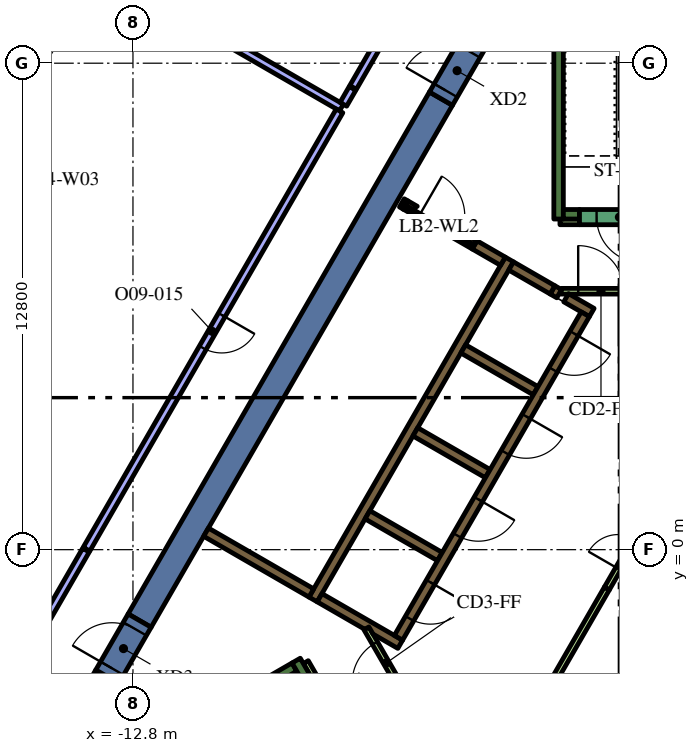
"""IFC4 building model, lengths in metres.
Left out: names, types, materials, properties, quantities, classifications, styles, units other than length and angle.
Written with IfcOpenShell. Run it as: python <this file> out.ifc"""

import sys

from ifc_helpers import new_model, si_unit, direction, frame, frame_2d, origin, place, context, subcontext, project, spatial, polyline, rectangle, outline, extrude, element, fill, save


model = new_model("IFC4")
c1 = context("Model", 3, precision=1e-05, world=origin(), true_north=direction((0.0, 1.0)))
c2 = subcontext(c1, "Body", "Model", "MODEL_VIEW")
j1 = project(units=[si_unit("LENGTHUNIT", "METRE"), si_unit("PLANEANGLEUNIT", "RADIAN")], contexts=[c1])
p1 = place(None, origin())
s1 = spatial("IfcSite", under=j1, at=p1, CompositionType="ELEMENT")
p2 = place(p1, origin())
s2 = spatial("IfcBuilding", under=s1, at=p2, CompositionType="ELEMENT")
p3 = place(p2, frame((0.0, 0.0, 239.4)))
s3 = spatial("IfcBuildingStorey", under=s2, at=p3, CompositionType="ELEMENT", Elevation=239.4)
p4 = place(p3, frame((-13.475, -3.339, 0.0), z_axis=(0.0, 0.0, 1.0), x_axis=(-0.499944726303, -0.866057313716, 0.0)))
e1 = element("IfcWall", 1, at=p4, inside=s3, PredefinedType="SOLIDWALL", context=c2, shape_type="SweptSolid", body=[
    extrude(rectangle(XDim=2.884, YDim=0.7, at=frame_2d((1.442, 0.0))), origin(), (0.0, 0.0, 1.0), 4.2),
])
p5 = place(p3, frame((-12.625, -1.867, 0.0), z_axis=(0.0, 0.0, 1.0), x_axis=(0.500008520515, 0.866020484407, 0.0)))
e2 = element("IfcWall", 2, at=p5, inside=s3, PredefinedType="SOLIDWALL", context=c2, shape_type="SweptSolid", body=[
    extrude(rectangle(XDim=15.859, YDim=0.7, at=frame_2d((7.929, 0.0))), origin(), (0.0, 0.0, 1.0), 4.2),
])
p6 = place(p3, frame((-1.6, 8.7, 0.0), z_axis=(0.0, 0.0, 1.0), x_axis=(0.0, 1.0, 0.0)))
e3 = element("IfcWall", 3, at=p6, inside=s3, PredefinedType="SOLIDWALL", context=c2, shape_type="SweptSolid", body=[
    extrude(rectangle(XDim=7.05, YDim=0.25, at=frame_2d((3.525, 0.0))), origin(), (0.0, 0.0, 1.0), 4.2),
])
p7 = place(p3, frame((-1.475, 8.825, 0.0), z_axis=(0.0, 0.0, 1.0), x_axis=(1.0, 0.0, 0.0)))
e4 = element("IfcWall", 4, at=p7, inside=s3, PredefinedType="SOLIDWALL", context=c2, shape_type="SweptSolid", body=[
    extrude(rectangle(XDim=0.425, YDim=0.25, at=frame_2d((0.212, 0.0))), origin(), (0.0, 0.0, 1.0), 4.2),
])
p8 = place(p3, frame((-14.44, -6.49, 0.0), z_axis=(0.0, 0.0, 1.0), x_axis=(0.866022966069, 0.500004222222, 0.0)))
e5 = element("IfcWall", 5, at=p8, inside=s3, PredefinedType="SOLIDWALL", context=c2, shape_type="SweptSolid", body=[
    extrude(rectangle(XDim=6.8, YDim=0.25, at=frame_2d((3.4, 0.0))), origin(), (0.0, 0.0, 1.0), 4.2),
])
p9 = place(p3, frame((-8.168, -3.503, 0.0), z_axis=(0.0, 0.0, 1.0), x_axis=(-0.499952099219, 0.866053057547, 0.0)))
e6 = element("IfcWall", 6, at=p9, inside=s3, PredefinedType="SOLIDWALL", context=c2, shape_type="SweptSolid", body=[
    extrude(rectangle(XDim=0.675, YDim=0.25, at=frame_2d((0.337, 0.0))), origin(), (0.0, 0.0, 1.0), 4.2),
])
p10 = place(p3, frame((-8.06, -1.311, 0.0), z_axis=(0.0, 0.0, 1.0), x_axis=(0.50000273126, 0.866023826885, 0.0)))
e7 = element("IfcWall", 7, at=p10, inside=s3, PredefinedType="SOLIDWALL", context=c2, shape_type="SweptSolid", body=[
    extrude(rectangle(XDim=10.33, YDim=0.25, at=frame_2d((5.165, 0.0))), origin(), (0.0, 0.0, 1.0), 4.2),
])
p11 = place(p3, frame((-1.758, 6.835, 0.0), z_axis=(0.0, 0.0, 1.0), x_axis=(0.865982457891, -0.500074377092, 0.0)))
e8 = element("IfcWall", 8, at=p11, inside=s3, PredefinedType="SOLIDWALL", context=c2, shape_type="SweptSolid", body=[
    extrude(rectangle(XDim=0.2, YDim=0.25, at=frame_2d((0.1, 0.0))), origin(), (0.0, 0.0, 1.0), 4.2),
])
p12 = place(p3, frame((-1.76, 6.836, 0.0), z_axis=(0.0, 0.0, 1.0), x_axis=(-0.865952863304, 0.500125622755, 0.0)))
e9 = element("IfcWall", 9, at=p12, inside=s3, PredefinedType="SOLIDWALL", context=c2, shape_type="SweptSolid", body=[
    extrude(rectangle(XDim=1.258, YDim=0.25, at=frame_2d((0.629, 0.0))), origin(), (0.0, 0.0, 1.0), 4.2),
])
p13 = place(p3, frame((-0.728, 6.24, 0.0), z_axis=(0.0, 0.0, 1.0), x_axis=(-0.865955664968, 0.500120771724, 0.0)))
e10 = element("IfcWall", 10, at=p13, inside=s3, PredefinedType="SOLIDWALL", context=c2, shape_type="SweptSolid", body=[
    extrude(rectangle(XDim=0.778, YDim=0.25, at=frame_2d((0.389, 0.0))), origin(), (0.0, 0.0, 1.0), 4.2),
])
for number, where, z_axis, x_axis in (
    (11, (-2.204, 4.182, 0.0), (0.0, 0.0, 1.0), (-0.866, 0.5, 0.0)),
    (12, (-5.369, 3.1, 0.0), (0.0, 0.0, 1.0), (0.866, -0.5, 0.0)),
    (13, (-4.724, -0.182, 0.0), (0.0, 0.0, 1.0), (-0.866, 0.5, 0.0)),
):
    element("IfcWall", number, at=place(p3, frame(where, z_axis=z_axis, x_axis=x_axis)), inside=s3, PredefinedType="SOLIDWALL", context=c2, shape_type="SweptSolid", body=[
        extrude(rectangle(XDim=2.2, YDim=0.25, at=frame_2d((1.1, 0.0))), origin(), (0.0, 0.0, 1.0), 4.2),
    ])
p14 = place(p3, origin())
e14 = element("IfcWall", 14, at=p14, inside=s3, PredefinedType="SOLIDWALL", context=c2, shape_type="SweptSolid", body=[
    extrude(outline(polyline([(-5.922, -2.257), (-5.922, -2.257), (-5.705, -2.382), (-5.83, -2.598), (-6.483, -2.221), (-6.591, -2.033), (-6.591, -2.033), (-6.7, -2.096), (-7.952, -1.373), (-7.827, -1.156), (-5.922, -2.257)])), origin(), (0.0, 0.0, 1.0), 4.2),
])
p15 = place(p3, frame((-8.106, -1.14, 0.0), z_axis=(0.0, 0.0, 1.0), x_axis=(-0.866008981251, 0.500028443584, 0.0)))
e15 = element("IfcWall", 15, at=p15, inside=s3, PredefinedType="SOLIDWALL", context=c2, shape_type="SweptSolid", body=[
    extrude(rectangle(XDim=3.2, YDim=0.25, at=frame_2d((1.6, 0.0))), origin(), (0.0, 0.0, 1.0), 4.2),
])
p16 = place(p3, frame((-5.725, 9.125, 0.0), z_axis=(0.0, 0.0, 1.0), x_axis=(0.866185586049, -0.49972245349, 0.0)))
e16 = element("IfcWall", 16, at=p16, inside=s3, PredefinedType="SOLIDWALL", context=c2, shape_type="SweptSolid", body=[
    extrude(rectangle(XDim=0.11, YDim=0.25, at=frame_2d((0.055, 0.0))), origin(), (0.0, 0.0, 1.0), 4.2),
])
p17 = place(p3, frame((-3.066, 7.59, 0.0), z_axis=(0.0, 0.0, 1.0), x_axis=(-0.866081358704, 0.49990307071, 0.0)))
e17 = element("IfcWall", 17, at=p17, inside=s3, PredefinedType="SOLIDWALL", context=c2, shape_type="SweptSolid", body=[
    extrude(rectangle(XDim=0.858, YDim=0.25, at=frame_2d((0.429, 0.0))), origin(), (0.0, 0.0, 1.0), 4.2),
])
e18 = element("IfcWall", 18, at=p14, inside=s3, PredefinedType="SOLIDWALL", context=c2, shape_type="SweptSolid", body=[
    extrude(outline(polyline([(-3.748, 8.128), (-3.813, 8.015), (-4.027, 8.139), (-4.017, 8.156), (-4.008, 8.173), (-4.0, 8.192), (-3.995, 8.21), (-3.991, 8.23), (-3.99, 8.25), (-3.99, 8.268), (-3.748, 8.128)])), origin(), (0.0, 0.0, 1.0), 4.2),
])
e19 = element("IfcWall", 19, at=p14, inside=s3, PredefinedType="SOLIDWALL", context=c2, shape_type="SweptSolid", body=[
    extrude(outline(polyline([(-5.689, 8.96), (-5.69, 8.961), (-5.565, 9.177), (-5.319, 9.035), (-5.335, 9.026), (-5.351, 9.015), (-5.366, 9.002), (-5.379, 8.988), (-5.392, 8.972), (-5.402, 8.956), (-5.412, 8.939), (-5.629, 9.064), (-5.629, 9.064), (-5.689, 8.96)])), origin(), (0.0, 0.0, 1.0), 4.2),
])
for number, where, z_axis, x_axis in (
    (20, (-8.252, -2.958, 0.0), (0.0, 0.0, 1.0), (0.5, -0.866, 0.0)),
    (21, (-1.564, 8.625, 0.0), (0.0, 0.0, 1.0), (1.0, 0.0, 0.0)),
):
    element("IfcWall", number, at=place(p3, frame(where, z_axis=z_axis, x_axis=x_axis)), inside=s3, PredefinedType="PARTITIONING", context=c2, shape_type="SweptSolid", body=[
        extrude(rectangle(XDim=0.514, YDim=0.15, at=frame_2d((0.257, 0.0))), origin(), (0.0, 0.0, 1.0), 3.45),
    ])
p18 = place(p3, frame((-1.887, -3.718, 0.0), z_axis=(0.0, 0.0, 1.0), x_axis=(0.500043732237, 0.866000153493, 0.0)))
e22 = element("IfcWall", 22, at=p18, inside=s3, PredefinedType="PARTITIONING", context=c2, shape_type="SweptSolid", body=[
    extrude(rectangle(XDim=3.114, YDim=0.15, at=frame_2d((1.557, 0.0))), origin(), (0.0, 0.0, 1.0), 3.45),
])
p19 = place(p3, frame((-0.898, 6.194, 0.0), z_axis=(0.0, 0.0, 1.0), x_axis=(-0.499996202215, -0.866027596426, 0.0)))
e23 = element("IfcWall", 23, at=p19, inside=s3, PredefinedType="SOLIDWALL", context=c2, shape_type="SweptSolid", body=[
    extrude(rectangle(XDim=9.83, YDim=0.25, at=frame_2d((4.915, 0.0))), origin(), (0.0, 0.0, 1.0), 4.2),
])
p20 = place(p19, frame((0.585, 0.0, 0.0)))
e24 = element("IfcOpeningElement", 24, at=p20, cuts=e23, PredefinedType="OPENING", context=c2, shape_type="SweptSolid", body=[
    extrude(rectangle(XDim=1.1, YDim=2.1, at=frame_2d((0.55, 1.05))), frame((0.0, 0.135, 0.0), z_axis=(0.0, -1.0, 0.0), x_axis=(1.0, 0.0, 0.0)), (0.0, 0.0, 1.0), 0.27),
])
p21 = place(p19, frame((3.105, 0.0, 0.0)))
e25 = element("IfcOpeningElement", 25, at=p21, cuts=e23, PredefinedType="OPENING", context=c2, shape_type="SweptSolid", body=[
    extrude(rectangle(XDim=1.1, YDim=2.1, at=frame_2d((0.55, 1.05))), frame((0.0, 0.135, 0.0), z_axis=(0.0, -1.0, 0.0), x_axis=(1.0, 0.0, 0.0)), (0.0, 0.0, 1.0), 0.27),
])
p22 = place(p19, frame((5.625, 0.0, 0.0)))
e26 = element("IfcOpeningElement", 26, at=p22, cuts=e23, PredefinedType="OPENING", context=c2, shape_type="SweptSolid", body=[
    extrude(rectangle(XDim=1.1, YDim=2.1, at=frame_2d((0.55, 1.05))), frame((0.0, 0.135, 0.0), z_axis=(0.0, -1.0, 0.0), x_axis=(1.0, 0.0, 0.0)), (0.0, 0.0, 1.0), 0.27),
])
p23 = place(p19, frame((8.145, 0.0, 0.0)))
e27 = element("IfcOpeningElement", 27, at=p23, cuts=e23, PredefinedType="OPENING", context=c2, shape_type="SweptSolid", body=[
    extrude(rectangle(XDim=1.1, YDim=2.1, at=frame_2d((0.55, 1.05))), frame((0.0, 0.135, 0.0), z_axis=(0.0, -1.0, 0.0), x_axis=(1.0, 0.0, 0.0)), (0.0, 0.0, 1.0), 0.27),
])
p24 = place(p3, frame((1.05, 8.75, 0.0), z_axis=(0.0, 0.0, 1.0), x_axis=(-1.0, 0.0, 0.0)))
e28 = element("IfcWall", 28, at=p24, inside=s3, PredefinedType="SOLIDWALL", context=c2, shape_type="SweptSolid", body=[
    extrude(rectangle(XDim=2.1, YDim=0.4, at=frame_2d((1.05, 0.0))), origin(), (0.0, 0.0, 1.0), 4.2),
])
p25 = place(p24, frame((0.45, 0.0, 0.0)))
e29 = element("IfcOpeningElement", 29, at=p25, cuts=e28, PredefinedType="OPENING", context=c2, shape_type="SweptSolid", body=[
    extrude(rectangle(XDim=1.2, YDim=2.1, at=frame_2d((0.6, 1.05))), frame((0.0, 0.21, 0.0), z_axis=(0.0, -1.0, 0.0), x_axis=(1.0, 0.0, 0.0)), (0.0, 0.0, 1.0), 0.42),
])
p26 = place(p3, frame((-0.33, -1.022, 0.0), z_axis=(0.0, 0.0, 1.0), x_axis=(0.500027713859, 0.866009402589, 0.0)))
e30 = element("IfcWall", 30, at=p26, inside=s3, PredefinedType="PARTITIONING", context=c2, shape_type="SweptSolid", body=[
    extrude(rectangle(XDim=2.1, YDim=0.15, at=frame_2d((1.05, 0.0))), origin(), (0.0, 0.0, 1.0), 3.45),
])
p27 = place(p26, frame((0.6, 0.0, 0.0)))
e31 = element("IfcOpeningElement", 31, at=p27, cuts=e30, PredefinedType="OPENING", context=c2, shape_type="SweptSolid", body=[
    extrude(rectangle(XDim=0.9, YDim=2.1, at=frame_2d((0.45, 1.05))), frame((0.0, 0.085, 0.0), z_axis=(0.0, -1.0, 0.0), x_axis=(1.0, 0.0, 0.0)), (0.0, 0.0, 1.0), 0.17),
])
p28 = place(p3, frame((-1.534, 6.8, 0.0), z_axis=(0.0, 0.0, 1.0), x_axis=(1.0, 0.0, 0.0)))
e32 = element("IfcWall", 32, at=p28, inside=s3, PredefinedType="PARTITIONING", context=c2, shape_type="SweptSolid", body=[
    extrude(rectangle(XDim=2.1, YDim=0.15, at=frame_2d((1.05, 0.0))), origin(), (0.0, 0.0, 1.0), 3.45),
])
p29 = place(p28, frame((0.45, 0.0, 0.0)))
e33 = element("IfcOpeningElement", 33, at=p29, cuts=e32, PredefinedType="OPENING", context=c2, shape_type="SweptSolid", body=[
    extrude(rectangle(XDim=1.2, YDim=2.1, at=frame_2d((0.6, 1.05))), frame((0.0, 0.085, 0.0), z_axis=(0.0, -1.0, 0.0), x_axis=(1.0, 0.0, 0.0)), (0.0, 0.0, 1.0), 0.17),
])
p30 = place(p3, frame((-5.606, -3.89, 0.0), z_axis=(0.0, 0.0, 1.0), x_axis=(-0.500027713859, 0.866009402589, 0.0)))
e34 = element("IfcWall", 34, at=p30, inside=s3, PredefinedType="PARTITIONING", context=c2, shape_type="SweptSolid", body=[
    extrude(rectangle(XDim=2.1, YDim=0.15, at=frame_2d((1.05, 0.0))), origin(), (0.0, 0.0, 1.0), 3.45),
])
p31 = place(p30, frame((0.45, 0.0, 0.0)))
e35 = element("IfcOpeningElement", 35, at=p31, cuts=e34, PredefinedType="OPENING", context=c2, shape_type="SweptSolid", body=[
    extrude(rectangle(XDim=1.2, YDim=2.1, at=frame_2d((0.6, 1.05))), frame((0.0, 0.085, 0.0), z_axis=(0.0, -1.0, 0.0), x_axis=(1.0, 0.0, 0.0)), (0.0, 0.0, 1.0), 0.17),
])
p32 = place(p3, frame((-5.659, 9.012, 0.0), z_axis=(0.0, 0.0, 1.0), x_axis=(0.866009402589, -0.500027713859, 0.0)))
e36 = element("IfcWall", 36, at=p32, inside=s3, PredefinedType="PARTITIONING", context=c2, shape_type="SweptSolid", body=[
    extrude(rectangle(XDim=2.1, YDim=0.12, at=frame_2d((1.05, 0.0))), origin(), (0.0, 0.0, 1.0), 3.45),
])
p33 = place(p32, frame((0.45, 0.0, 0.0)))
e37 = element("IfcOpeningElement", 37, at=p33, cuts=e36, PredefinedType="OPENING", context=c2, shape_type="SweptSolid", body=[
    extrude(rectangle(XDim=1.2, YDim=2.1, at=frame_2d((0.6, 1.05))), frame((0.0, 0.07, 0.0), z_axis=(0.0, -1.0, 0.0), x_axis=(1.0, 0.0, 0.0)), (0.0, 0.0, 1.0), 0.14),
])
p34 = place(p3, frame((-4.696, 11.867, 0.0), z_axis=(0.0, 0.0, 1.0), x_axis=(0.499892348375, 0.866087547558, 0.0)))
e38 = element("IfcWall", 38, at=p34, inside=s3, PredefinedType="SOLIDWALL", context=c2, shape_type="SweptSolid", body=[
    extrude(rectangle(XDim=1.7, YDim=0.7, at=frame_2d((0.85, 0.0))), origin(), (0.0, 0.0, 1.0), 4.2),
])
p35 = place(p34, frame((0.25, 0.0, 0.0)))
e39 = element("IfcOpeningElement", 39, at=p35, cuts=e38, PredefinedType="OPENING", context=c2, shape_type="SweptSolid", body=[
    extrude(rectangle(XDim=1.2, YDim=2.1, at=frame_2d((0.6, 1.05))), frame((0.0, 0.36, 0.0), z_axis=(0.0, -1.0, 0.0), x_axis=(1.0, 0.0, 0.0)), (0.0, 0.0, 1.0), 0.72),
])
p36 = place(p3, frame((-13.475, -3.339, 0.0), z_axis=(0.0, 0.0, 1.0), x_axis=(0.499954529098, 0.86605165483, 0.0)))
e40 = element("IfcWall", 40, at=p36, inside=s3, PredefinedType="SOLIDWALL", context=c2, shape_type="SweptSolid", body=[
    extrude(rectangle(XDim=1.7, YDim=0.7, at=frame_2d((0.85, 0.0))), origin(), (0.0, 0.0, 1.0), 4.2),
])
p37 = place(p36, frame((0.25, 0.0, 0.0)))
e41 = element("IfcOpeningElement", 41, at=p37, cuts=e40, PredefinedType="OPENING", context=c2, shape_type="SweptSolid", body=[
    extrude(rectangle(XDim=1.2, YDim=2.1, at=frame_2d((0.6, 1.05))), frame((0.0, 0.36, 0.0), z_axis=(0.0, -1.0, 0.0), x_axis=(1.0, 0.0, 0.0)), (0.0, 0.0, 1.0), 0.72),
])
p38 = place(p3, frame((-7.314, 11.632, 0.0), z_axis=(0.0, 0.0, 1.0), x_axis=(-0.8660128559, 0.500021732944, 0.0)))
e42 = element("IfcWall", 42, at=p38, inside=s3, PredefinedType="PARTITIONING", context=c2, shape_type="SweptSolid", body=[
    extrude(rectangle(XDim=3.625, YDim=0.2, at=frame_2d((1.812, 0.0))), origin(), (0.0, 0.0, 1.0), 3.45),
])
p39 = place(p3, frame((-7.022, 12.137, 0.0), z_axis=(0.0, 0.0, 1.0), x_axis=(-0.500159754115, -0.865933150054, 0.0)))
e43 = element("IfcWall", 43, at=p39, inside=s3, PredefinedType="PARTITIONING", context=c2, shape_type="SweptSolid", body=[
    extrude(rectangle(XDim=0.483, YDim=0.2, at=frame_2d((0.242, 0.0))), origin(), (0.0, 0.0, 1.0), 3.45),
])
p40 = place(p3, frame((-3.364, 18.474, 0.0), z_axis=(0.0, 0.0, 1.0), x_axis=(-0.499987324581, -0.866032721818, 0.0)))
e44 = element("IfcWall", 44, at=p40, inside=s3, PredefinedType="PARTITIONING", context=c2, shape_type="SweptSolid", body=[
    extrude(rectangle(XDim=7.287, YDim=0.2, at=frame_2d((3.644, 0.0))), origin(), (0.0, 0.0, 1.0), 3.45),
])
p41 = place(p40, frame((3.1, 0.0, 0.0)))
e45 = element("IfcOpeningElement", 45, at=p41, cuts=e44, PredefinedType="OPENING", context=c2, shape_type="SweptSolid", body=[
    extrude(rectangle(XDim=1.0, YDim=2.1, at=frame_2d((0.5, 1.05))), frame((0.0, 0.11, 0.0), z_axis=(0.0, -1.0, 0.0), x_axis=(1.0, 0.0, 0.0)), (0.0, 0.0, 1.0), 0.22),
])
p42 = place(p3, frame((-7.364, 11.545, 0.0), z_axis=(0.0, 0.0, 1.0), x_axis=(-0.500001759768, -0.86602438778, 0.0)))
e46 = element("IfcWall", 46, at=p42, inside=s3, PredefinedType="PARTITIONING", context=c2, shape_type="SweptSolid", body=[
    extrude(rectangle(XDim=13.317, YDim=0.2, at=frame_2d((6.658, 0.0))), origin(), (0.0, 0.0, 1.0), 3.45),
])
p43 = place(p42, frame((6.2, 0.0, 0.0)))
e47 = element("IfcOpeningElement", 47, at=p43, cuts=e46, PredefinedType="OPENING", context=c2, shape_type="SweptSolid", body=[
    extrude(rectangle(XDim=1.0, YDim=2.1, at=frame_2d((0.5, 1.05))), frame((0.0, 0.11, 0.0), z_axis=(0.0, -1.0, 0.0), x_axis=(1.0, 0.0, 0.0)), (0.0, 0.0, 1.0), 0.22),
])
p44 = place(p3, frame((-14.037, -0.013, 0.0), z_axis=(0.0, 0.0, 1.0), x_axis=(-0.500018205831, -0.866014892388, 0.0)))
e48 = element("IfcWall", 48, at=p44, inside=s3, PredefinedType="PARTITIONING", context=c2, shape_type="SweptSolid", body=[
    extrude(rectangle(XDim=5.693, YDim=0.2, at=frame_2d((2.846, 0.0))), origin(), (0.0, 0.0, 1.0), 3.45),
])
p45 = place(p3, frame((-14.038, 14.864, 0.0), z_axis=(0.0, 0.0, 1.0), x_axis=(-0.517846166225, -0.855473756538, 0.0)))
e49 = element("IfcWall", 49, at=p45, inside=s3, PredefinedType="SOLIDWALL", context=c2, shape_type="SweptSolid", body=[
    extrude(rectangle(XDim=5.298, YDim=0.24, at=frame_2d((2.649, 0.0))), origin(), (0.0, 0.0, 1.0), 3.95),
])
p46 = place(p45, frame((0.294, 0.0, 0.9)))
e50 = element("IfcOpeningElement", 50, at=p46, cuts=e49, PredefinedType="OPENING", context=c2, shape_type="SweptSolid", body=[
    extrude(rectangle(XDim=1.5, YDim=2.55, at=frame_2d((0.75, 1.275))), frame((0.0, 0.13, 0.0), z_axis=(0.0, -1.0, 0.0), x_axis=(1.0, 0.0, 0.0)), (0.0, 0.0, 1.0), 0.26),
])
p47 = place(p45, frame((3.504, 0.0, 0.9)))
e51 = element("IfcOpeningElement", 51, at=p47, cuts=e49, PredefinedType="OPENING", context=c2, shape_type="SweptSolid", body=[
    extrude(rectangle(XDim=1.5, YDim=2.55, at=frame_2d((0.75, 1.275))), frame((0.0, 0.13, 0.0), z_axis=(0.0, -1.0, 0.0), x_axis=(1.0, 0.0, 0.0)), (0.0, 0.0, 1.0), 0.26),
])
p48 = place(p20, origin())
e52 = element("IfcDoor", 52, at=p48, inside=s3, OperationType="DOUBLE_DOOR_SLIDING", PredefinedType="DOOR", context=c2, shape_type="SweptSolid", body=[
    extrude(rectangle(XDim=1.1, YDim=2.1, at=frame_2d((0.55, 1.05))), frame((0.0, 0.025, 0.0), z_axis=(0.0, -1.0, 0.0), x_axis=(1.0, 0.0, 0.0)), (0.0, 0.0, 1.0), 0.05),
])
fill(e24, e52)
p49 = place(p21, origin())
e53 = element("IfcDoor", 53, at=p49, inside=s3, OperationType="DOUBLE_DOOR_SLIDING", PredefinedType="DOOR", context=c2, shape_type="SweptSolid", body=[
    extrude(rectangle(XDim=1.1, YDim=2.1, at=frame_2d((0.55, 1.05))), frame((0.0, 0.025, 0.0), z_axis=(0.0, -1.0, 0.0), x_axis=(1.0, 0.0, 0.0)), (0.0, 0.0, 1.0), 0.05),
])
fill(e25, e53)
p50 = place(p22, origin())
e54 = element("IfcDoor", 54, at=p50, inside=s3, OperationType="DOUBLE_DOOR_SLIDING", PredefinedType="DOOR", context=c2, shape_type="SweptSolid", body=[
    extrude(rectangle(XDim=1.1, YDim=2.1, at=frame_2d((0.55, 1.05))), frame((0.0, 0.025, 0.0), z_axis=(0.0, -1.0, 0.0), x_axis=(1.0, 0.0, 0.0)), (0.0, 0.0, 1.0), 0.05),
])
fill(e26, e54)
p51 = place(p23, origin())
e55 = element("IfcDoor", 55, at=p51, inside=s3, OperationType="DOUBLE_DOOR_SLIDING", PredefinedType="DOOR", context=c2, shape_type="SweptSolid", body=[
    extrude(rectangle(XDim=1.1, YDim=2.1, at=frame_2d((0.55, 1.05))), frame((0.0, 0.025, 0.0), z_axis=(0.0, -1.0, 0.0), x_axis=(1.0, 0.0, 0.0)), (0.0, 0.0, 1.0), 0.05),
])
fill(e27, e55)
p52 = place(p25, origin())
e56 = element("IfcDoor", 56, at=p52, inside=s3, OperationType="SINGLE_SWING_LEFT", PredefinedType="DOOR", context=c2, shape_type="SweptSolid", body=[
    extrude(rectangle(XDim=1.2, YDim=2.1, at=frame_2d((0.6, 1.05))), frame((0.0, 0.025, 0.0), z_axis=(0.0, -1.0, 0.0), x_axis=(1.0, 0.0, 0.0)), (0.0, 0.0, 1.0), 0.05),
])
fill(e29, e56)
p53 = place(p27, origin())
e57 = element("IfcDoor", 57, at=p53, inside=s3, OperationType="SINGLE_SWING_LEFT", PredefinedType="DOOR", context=c2, shape_type="SweptSolid", body=[
    extrude(rectangle(XDim=0.9, YDim=2.1, at=frame_2d((0.45, 1.05))), frame((0.0, 0.025, 0.0), z_axis=(0.0, -1.0, 0.0), x_axis=(1.0, 0.0, 0.0)), (0.0, 0.0, 1.0), 0.05),
])
fill(e31, e57)
p54 = place(p29, origin())
e58 = element("IfcDoor", 58, at=p54, inside=s3, OperationType="SINGLE_SWING_LEFT", PredefinedType="DOOR", context=c2, shape_type="SweptSolid", body=[
    extrude(rectangle(XDim=1.2, YDim=2.1, at=frame_2d((0.6, 1.05))), frame((0.0, 0.025, 0.0), z_axis=(0.0, -1.0, 0.0), x_axis=(1.0, 0.0, 0.0)), (0.0, 0.0, 1.0), 0.05),
])
fill(e33, e58)
p55 = place(p31, origin())
e59 = element("IfcDoor", 59, at=p55, inside=s3, OperationType="SINGLE_SWING_LEFT", PredefinedType="DOOR", context=c2, shape_type="SweptSolid", body=[
    extrude(rectangle(XDim=1.2, YDim=2.1, at=frame_2d((0.6, 1.05))), frame((0.0, 0.025, 0.0), z_axis=(0.0, -1.0, 0.0), x_axis=(1.0, 0.0, 0.0)), (0.0, 0.0, 1.0), 0.05),
])
fill(e35, e59)
p56 = place(p33, origin())
e60 = element("IfcDoor", 60, at=p56, inside=s3, OperationType="SINGLE_SWING_LEFT", PredefinedType="DOOR", context=c2, shape_type="SweptSolid", body=[
    extrude(rectangle(XDim=1.2, YDim=2.1, at=frame_2d((0.6, 1.05))), frame((0.0, 0.025, 0.0), z_axis=(0.0, -1.0, 0.0), x_axis=(1.0, 0.0, 0.0)), (0.0, 0.0, 1.0), 0.05),
])
fill(e37, e60)
p57 = place(p35, origin())
e61 = element("IfcDoor", 61, at=p57, inside=s3, OperationType="SINGLE_SWING_LEFT", PredefinedType="DOOR", context=c2, shape_type="SweptSolid", body=[
    extrude(rectangle(XDim=1.2, YDim=2.1, at=frame_2d((0.6, 1.05))), frame((0.0, 0.025, 0.0), z_axis=(0.0, -1.0, 0.0), x_axis=(1.0, 0.0, 0.0)), (0.0, 0.0, 1.0), 0.05),
])
fill(e39, e61)
p58 = place(p37, origin())
e62 = element("IfcDoor", 62, at=p58, inside=s3, OperationType="SINGLE_SWING_LEFT", PredefinedType="DOOR", context=c2, shape_type="SweptSolid", body=[
    extrude(rectangle(XDim=1.2, YDim=2.1, at=frame_2d((0.6, 1.05))), frame((0.0, 0.025, 0.0), z_axis=(0.0, -1.0, 0.0), x_axis=(1.0, 0.0, 0.0)), (0.0, 0.0, 1.0), 0.05),
])
fill(e41, e62)
p59 = place(p43, origin())
e63 = element("IfcDoor", 63, at=p59, inside=s3, OperationType="SINGLE_SWING_RIGHT", PredefinedType="DOOR", context=c2, shape_type="SweptSolid", body=[
    extrude(rectangle(XDim=1.0, YDim=2.1, at=frame_2d((0.5, 1.05))), frame((0.0, 0.025, 0.0), z_axis=(0.0, -1.0, 0.0), x_axis=(1.0, 0.0, 0.0)), (0.0, 0.0, 1.0), 0.05),
])
fill(e47, e63)
save(model, sys.argv[1])
